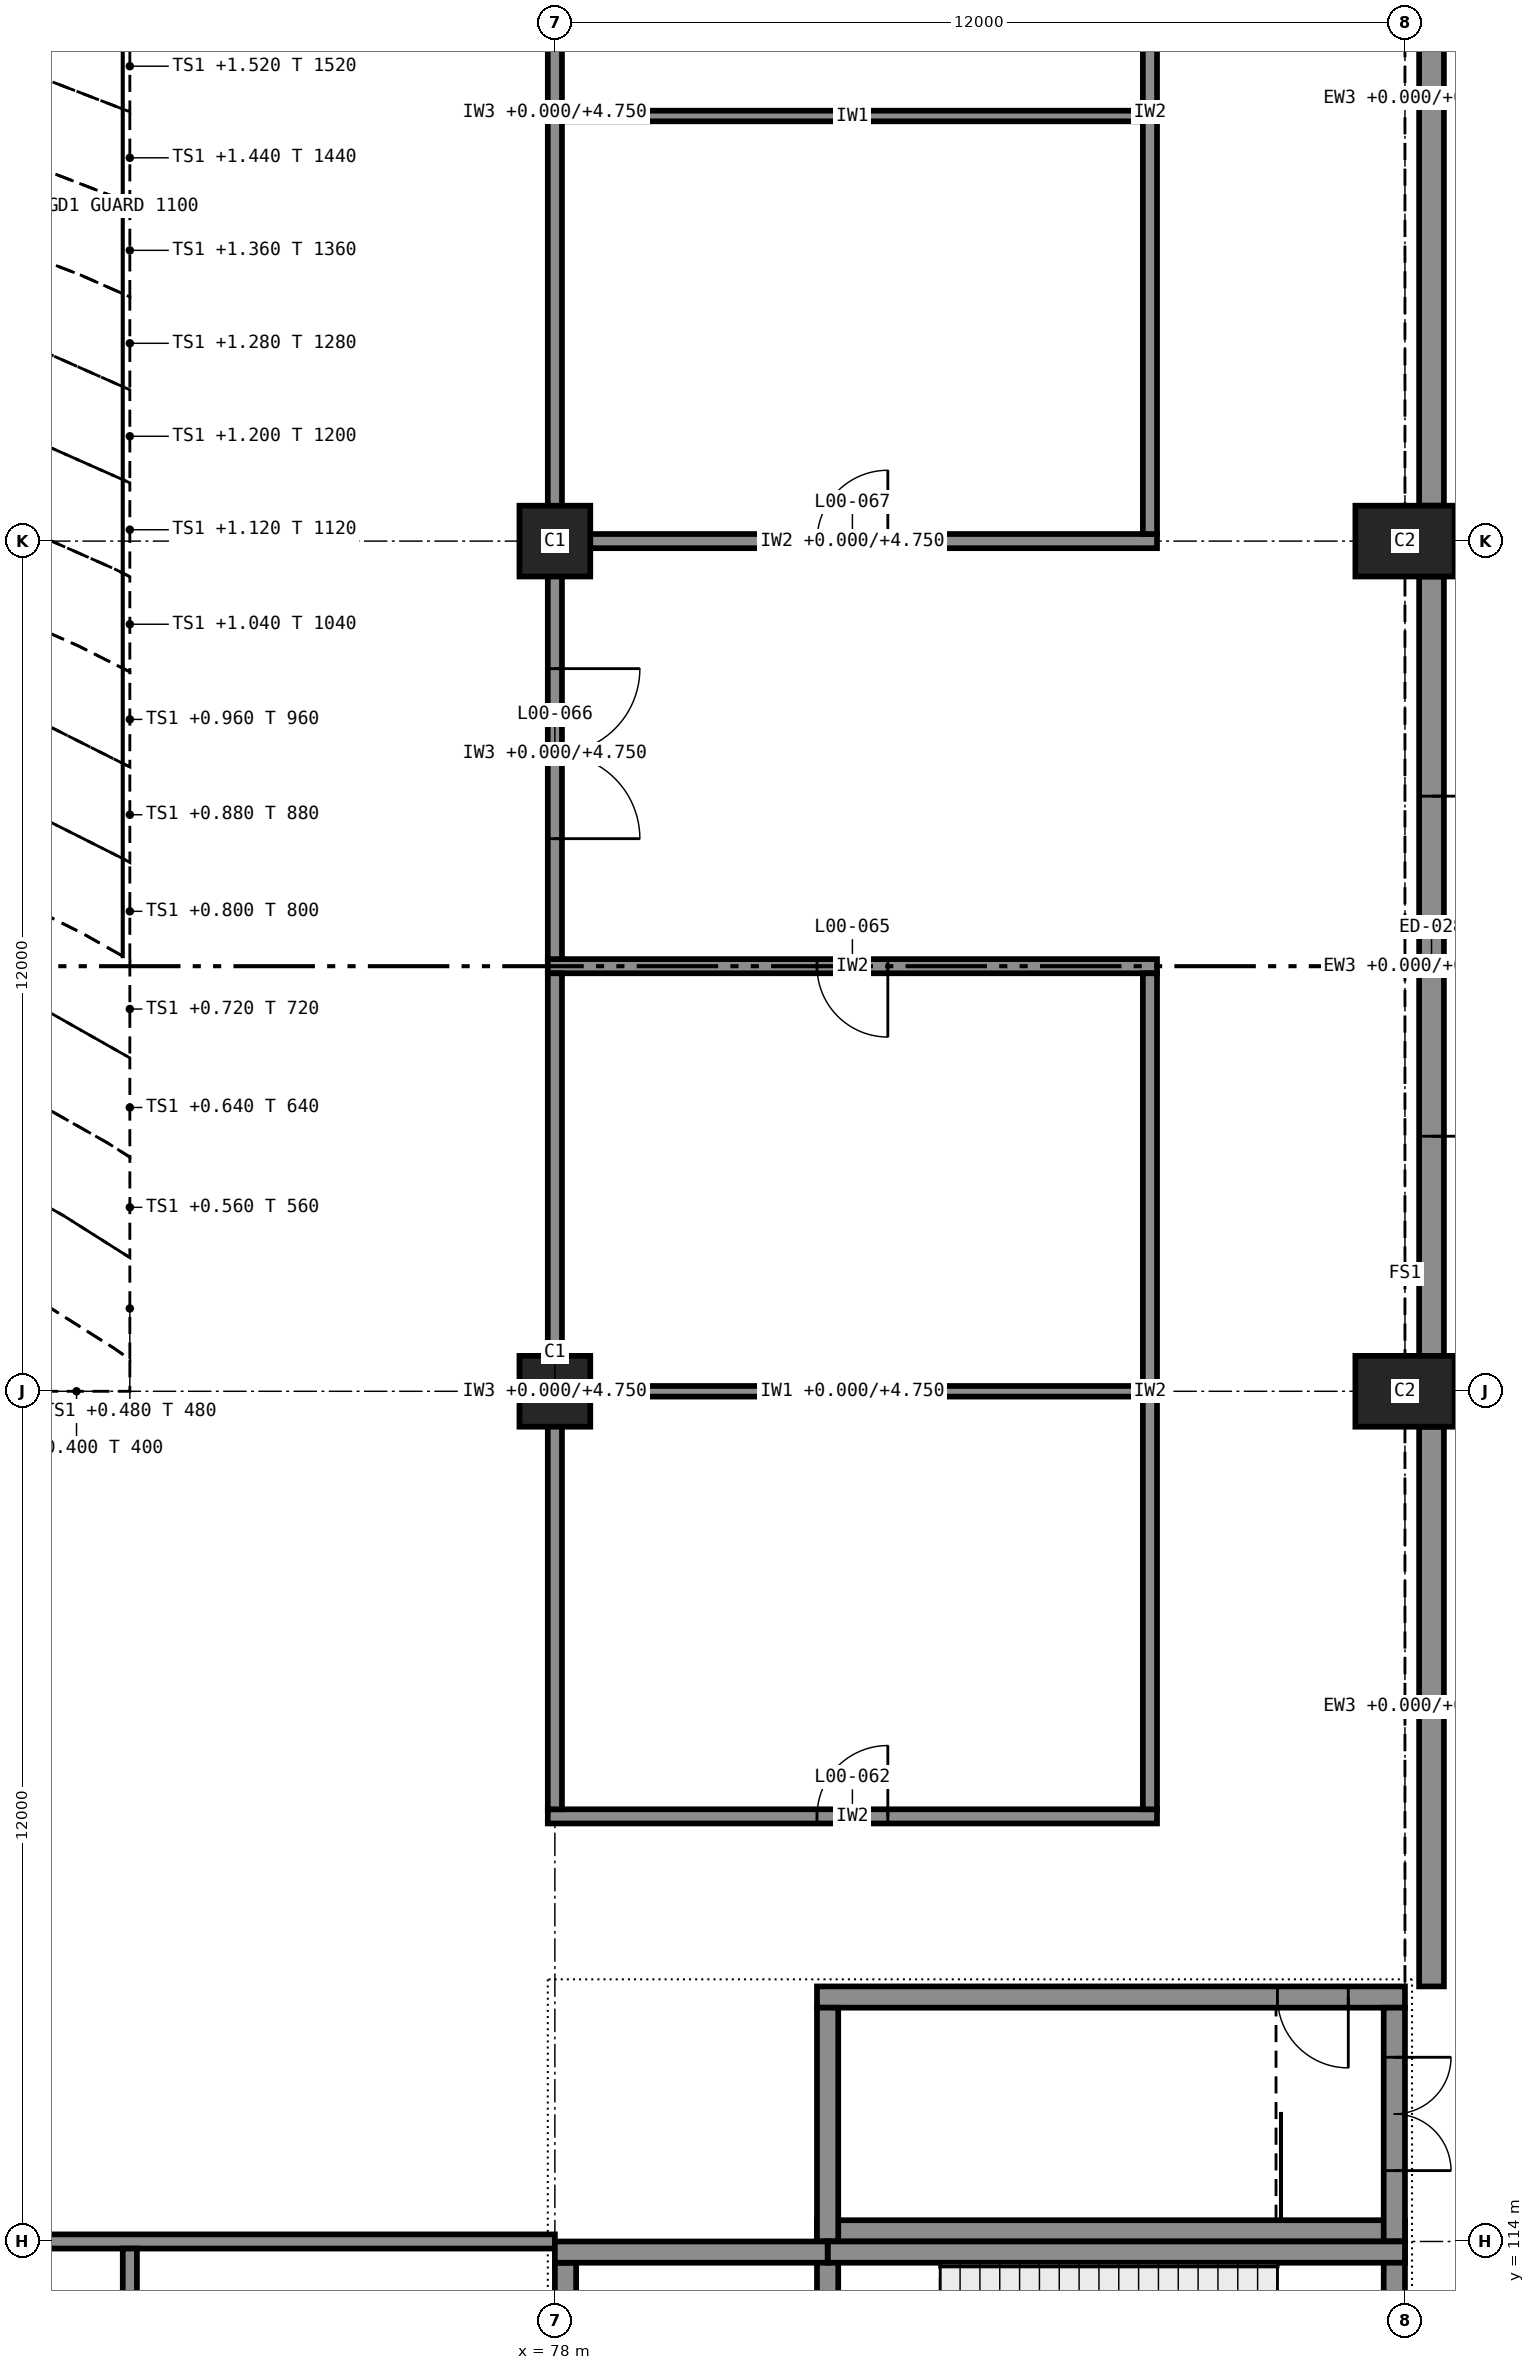
"""IFC4 building model, lengths in metres.
Left out: names, types, materials, properties, quantities, classifications, styles, units other than length and angle.
Written with IfcOpenShell. Run it as: python <this file> out.ifc"""

import sys

from ifc_helpers import new_model, si_unit, direction, frame, frame_2d, origin, origin_2d, place, context, subcontext, project, spatial, rectangle, extrude, element, fill, save


model = new_model("IFC4")
c1 = context("Model", 3, precision=1e-05, world=origin(), true_north=direction((0.0, 1.0)))
c2 = subcontext(c1, "Body", "Model", "MODEL_VIEW")
j1 = project(units=[si_unit("LENGTHUNIT", "METRE"), si_unit("PLANEANGLEUNIT", "RADIAN")], contexts=[c1])
p1 = place(None, origin())
s1 = spatial("IfcSite", under=j1, at=p1, CompositionType="ELEMENT")
p2 = place(p1, origin())
s2 = spatial("IfcBuilding", under=s1, at=p2, CompositionType="ELEMENT")
p3 = place(p2, origin())
s3 = spatial("IfcBuildingStorey", under=s2, at=p3, CompositionType="ELEMENT", Elevation=0.0)
for number, where, z_axis, x_axis in (
    (1, (78.0, 126.0, 0.0), (0.0, 0.0, 1.0), (1.0, 0.0, 0.0)),
    (2, (78.0, 138.0, 0.0), (0.0, 0.0, 1.0), (1.0, 0.0, 0.0)),
):
    element("IfcColumn", number, at=place(p3, frame(where, z_axis=z_axis, x_axis=x_axis)), inside=s3, PredefinedType="COLUMN", context=c2, shape_type="SweptSolid", body=[
        extrude(rectangle(XDim=1.0, YDim=1.0, at=origin_2d()), origin(), (0.0, 0.0, 1.0), 6.0),
    ])
for number, where, z_axis, x_axis in (
    (3, (90.0, 126.0, 0.0), (0.0, 0.0, 1.0), (1.0, 0.0, 0.0)),
    (4, (90.0, 138.0, 0.0), (0.0, 0.0, 1.0), (1.0, 0.0, 0.0)),
):
    element("IfcColumn", number, at=place(p3, frame(where, z_axis=z_axis, x_axis=x_axis)), inside=s3, PredefinedType="COLUMN", context=c2, shape_type="SweptSolid", body=[
        extrude(rectangle(XDim=1.4, YDim=1.0, at=origin_2d()), origin(), (0.0, 0.0, 1.0), 6.0),
    ])
p4 = place(p3, frame((90.0, 114.15, 0.0), z_axis=(0.0, 0.0, 1.0), x_axis=(-1.0, 0.0, 0.0)))
e5 = element("IfcWall", 5, at=p4, inside=s3, PredefinedType="SHEAR", context=c2, shape_type="SweptSolid", body=[
    extrude(rectangle(XDim=8.3, YDim=0.3, at=frame_2d((4.15, 0.0))), origin(), (0.0, 0.0, 1.0), 5.75),
])
p5 = place(p3, frame((90.0, 117.45, 0.0), z_axis=(0.0, 0.0, 1.0), x_axis=(-1.0, 0.0, 0.0)))
e6 = element("IfcWall", 6, at=p5, inside=s3, PredefinedType="SHEAR", context=c2, shape_type="SweptSolid", body=[
    extrude(rectangle(XDim=8.3, YDim=0.3, at=frame_2d((4.15, 0.0))), origin(), (0.0, 0.0, 1.0), 5.75),
])
p6 = place(p5, frame((0.8, 0.0, 0.0)))
e7 = element("IfcOpeningElement", 7, at=p6, cuts=e6, PredefinedType="OPENING", context=c2, shape_type="SweptSolid", body=[
    extrude(rectangle(XDim=1.0, YDim=2.1, at=frame_2d((0.5, 1.05))), frame((0.0, 0.16, 0.0), z_axis=(0.0, -1.0, 0.0), x_axis=(1.0, 0.0, 0.0)), (0.0, 0.0, 1.0), 0.32),
])
p7 = place(p3, frame((89.85, 114.0, 0.0), z_axis=(0.0, 0.0, 1.0), x_axis=(0.0, 1.0, 0.0)))
e8 = element("IfcWall", 8, at=p7, inside=s3, PredefinedType="SHEAR", context=c2, shape_type="SweptSolid", body=[
    extrude(rectangle(XDim=3.3, YDim=0.3, at=frame_2d((1.65, 0.0))), origin(), (0.0, 0.0, 1.0), 5.75),
])
p8 = place(p7, frame((1.0, 0.0, 0.0)))
e9 = element("IfcOpeningElement", 9, at=p8, cuts=e8, PredefinedType="OPENING", context=c2, shape_type="SweptSolid", body=[
    extrude(rectangle(XDim=1.6, YDim=2.1, at=frame_2d((0.8, 1.05))), frame((0.0, 0.16, 0.0), z_axis=(0.0, -1.0, 0.0), x_axis=(1.0, 0.0, 0.0)), (0.0, 0.0, 1.0), 0.32),
])
p9 = place(p3, frame((81.85, 114.0, 0.0), z_axis=(0.0, 0.0, 1.0), x_axis=(0.0, 1.0, 0.0)))
e10 = element("IfcWall", 10, at=p9, inside=s3, PredefinedType="SHEAR", context=c2, shape_type="SweptSolid", body=[
    extrude(rectangle(XDim=3.3, YDim=0.3, at=frame_2d((1.65, 0.0))), origin(), (0.0, 0.0, 1.0), 5.75),
])
p10 = place(p3, frame((90.0, 113.85, 0.0), z_axis=(0.0, 0.0, 1.0), x_axis=(-1.0, 0.0, 0.0)))
e11 = element("IfcWall", 11, at=p10, inside=s3, PredefinedType="SHEAR", context=c2, shape_type="SweptSolid", body=[
    extrude(rectangle(XDim=8.15, YDim=0.3, at=frame_2d((4.075, 0.0))), origin(), (0.0, 0.0, 1.0), 5.75),
])
p11 = place(p3, frame((81.85, 113.85, 0.0), z_axis=(0.0, 0.0, 1.0), x_axis=(-1.0, 0.0, 0.0)))
e12 = element("IfcWall", 12, at=p11, inside=s3, PredefinedType="SHEAR", context=c2, shape_type="SweptSolid", body=[
    extrude(rectangle(XDim=3.85, YDim=0.3, at=frame_2d((1.925, 0.0))), origin(), (0.0, 0.0, 1.0), 5.75),
])
p12 = place(p3, frame((89.85, 110.55, 0.0), z_axis=(0.0, 0.0, 1.0), x_axis=(0.0, 1.0, 0.0)))
e13 = element("IfcWall", 13, at=p12, inside=s3, PredefinedType="SHEAR", context=c2, shape_type="SweptSolid", body=[
    extrude(rectangle(XDim=3.45, YDim=0.3, at=frame_2d((1.725, 0.0))), origin(), (0.0, 0.0, 1.0), 5.75),
])
p13 = place(p12, frame((0.85, 0.0, 0.0)))
e14 = element("IfcOpeningElement", 14, at=p13, cuts=e13, PredefinedType="OPENING", context=c2, shape_type="SweptSolid", body=[
    extrude(rectangle(XDim=1.6, YDim=2.1, at=frame_2d((0.8, 1.05))), frame((0.0, 0.16, 0.0), z_axis=(0.0, -1.0, 0.0), x_axis=(1.0, 0.0, 0.0)), (0.0, 0.0, 1.0), 0.32),
])
p14 = place(p3, frame((78.15, 110.55, 0.0), z_axis=(0.0, 0.0, 1.0), x_axis=(0.0, 1.0, 0.0)))
e15 = element("IfcWall", 15, at=p14, inside=s3, PredefinedType="SHEAR", context=c2, shape_type="SweptSolid", body=[
    extrude(rectangle(XDim=3.15, YDim=0.3, at=frame_2d((1.575, 0.0))), origin(), (0.0, 0.0, 1.0), 5.75),
])
p15 = place(p14, frame((1.15, 0.0, 0.0)))
e16 = element("IfcOpeningElement", 16, at=p15, cuts=e15, PredefinedType="OPENING", context=c2, shape_type="SweptSolid", body=[
    extrude(rectangle(XDim=1.0, YDim=2.1, at=frame_2d((0.5, 1.05))), frame((0.0, 0.16, 0.0), z_axis=(0.0, -1.0, 0.0), x_axis=(1.0, 0.0, 0.0)), (0.0, 0.0, 1.0), 0.32),
])
p16 = place(p3, frame((81.85, 110.7, 0.0), z_axis=(0.0, 0.0, 1.0), x_axis=(0.0, 1.0, 0.0)))
e17 = element("IfcWall", 17, at=p16, inside=s3, PredefinedType="SHEAR", context=c2, shape_type="SweptSolid", body=[
    extrude(rectangle(XDim=3.3, YDim=0.3, at=frame_2d((1.65, 0.0))), origin(), (0.0, 0.0, 1.0), 5.75),
])
p17 = place(p3, frame((90.375, 117.6, 0.0), z_axis=(0.0, 0.0, 1.0), x_axis=(0.0, 1.0, 0.0)))
e18 = element("IfcWall", 18, at=p17, inside=s3, PredefinedType="STANDARD", context=c2, shape_type="SweptSolid", body=[
    extrude(rectangle(XDim=7.9, YDim=0.35, at=frame_2d((3.95, 0.0))), origin(), (0.0, 0.0, 1.0), 6.0),
])
p18 = place(p3, frame((90.375, 126.5, 0.0), z_axis=(0.0, 0.0, 1.0), x_axis=(0.0, 1.0, 0.0)))
e19 = element("IfcWall", 19, at=p18, inside=s3, PredefinedType="STANDARD", context=c2, shape_type="SweptSolid", body=[
    extrude(rectangle(XDim=11.0, YDim=0.35, at=frame_2d((5.5, 0.0))), origin(), (0.0, 0.0, 1.0), 6.0),
])
p19 = place(p18, frame((3.1, 0.0, 0.0)))
e20 = element("IfcOpeningElement", 20, at=p19, cuts=e19, PredefinedType="OPENING", context=c2, shape_type="SweptSolid", body=[
    extrude(rectangle(XDim=4.8, YDim=2.4, at=frame_2d((2.4, 1.2))), frame((0.0, 0.185, 0.0), z_axis=(0.0, -1.0, 0.0), x_axis=(1.0, 0.0, 0.0)), (0.0, 0.0, 1.0), 0.37),
])
p20 = place(p3, frame((90.375, 138.5, 0.0), z_axis=(0.0, 0.0, 1.0), x_axis=(0.0, 1.0, 0.0)))
e21 = element("IfcWall", 21, at=p20, inside=s3, PredefinedType="STANDARD", context=c2, shape_type="SweptSolid", body=[
    extrude(rectangle(XDim=11.5, YDim=0.35, at=frame_2d((5.75, 0.0))), origin(), (0.0, 0.0, 1.0), 6.0),
])
p21 = place(p3, frame((29.9, 114.0, 0.0), z_axis=(0.0, 0.0, 1.0), x_axis=(1.0, 0.0, 0.0)))
e22 = element("IfcWall", 22, at=p21, inside=s3, PredefinedType="PARTITIONING", context=c2, shape_type="SweptSolid", body=[
    extrude(rectangle(XDim=48.1, YDim=0.2, at=frame_2d((24.05, 0.0))), origin(), (0.0, 0.0, 1.0), 4.75),
])
p22 = place(p3, frame((77.9, 120.0, 0.0), z_axis=(0.0, 0.0, 1.0), x_axis=(1.0, 0.0, 0.0)))
e23 = element("IfcWall", 23, at=p22, inside=s3, PredefinedType="PARTITIONING", context=c2, shape_type="SweptSolid", body=[
    extrude(rectangle(XDim=8.6, YDim=0.2, at=frame_2d((4.3, 0.0))), origin(), (0.0, 0.0, 1.0), 5.75),
])
p23 = place(p22, frame((3.8, 0.0, 0.0)))
e24 = element("IfcOpeningElement", 24, at=p23, cuts=e23, PredefinedType="OPENING", context=c2, shape_type="SweptSolid", body=[
    extrude(rectangle(XDim=1.0, YDim=2.1, at=frame_2d((0.5, 1.05))), frame((0.0, 0.11, 0.0), z_axis=(0.0, -1.0, 0.0), x_axis=(1.0, 0.0, 0.0)), (0.0, 0.0, 1.0), 0.22),
])
p24 = place(p3, frame((78.1, 126.0, 0.0), z_axis=(0.0, 0.0, 1.0), x_axis=(1.0, 0.0, 0.0)))
e25 = element("IfcWall", 25, at=p24, inside=s3, PredefinedType="PARTITIONING", context=c2, shape_type="SweptSolid", body=[
    extrude(rectangle(XDim=8.2, YDim=0.15, at=frame_2d((4.1, 0.0))), origin(), (0.0, 0.0, 1.0), 4.75),
])
p25 = place(p3, frame((77.9, 132.0, 0.0), z_axis=(0.0, 0.0, 1.0), x_axis=(1.0, 0.0, 0.0)))
e26 = element("IfcWall", 26, at=p25, inside=s3, PredefinedType="PARTITIONING", context=c2, shape_type="SweptSolid", body=[
    extrude(rectangle(XDim=8.6, YDim=0.2, at=frame_2d((4.3, 0.0))), origin(), (0.0, 0.0, 1.0), 5.75),
])
p26 = place(p25, frame((3.8, 0.0, 0.0)))
e27 = element("IfcOpeningElement", 27, at=p26, cuts=e26, PredefinedType="OPENING", context=c2, shape_type="SweptSolid", body=[
    extrude(rectangle(XDim=1.0, YDim=2.1, at=frame_2d((0.5, 1.05))), frame((0.0, 0.11, 0.0), z_axis=(0.0, -1.0, 0.0), x_axis=(1.0, 0.0, 0.0)), (0.0, 0.0, 1.0), 0.22),
])
p27 = place(p3, frame((77.9, 138.0, 0.0), z_axis=(0.0, 0.0, 1.0), x_axis=(1.0, 0.0, 0.0)))
e28 = element("IfcWall", 28, at=p27, inside=s3, PredefinedType="PARTITIONING", context=c2, shape_type="SweptSolid", body=[
    extrude(rectangle(XDim=8.6, YDim=0.2, at=frame_2d((4.3, 0.0))), origin(), (0.0, 0.0, 1.0), 4.75),
])
p28 = place(p27, frame((3.8, 0.0, 0.0)))
e29 = element("IfcOpeningElement", 29, at=p28, cuts=e28, PredefinedType="OPENING", context=c2, shape_type="SweptSolid", body=[
    extrude(rectangle(XDim=1.0, YDim=2.1, at=frame_2d((0.5, 1.05))), frame((0.0, 0.11, 0.0), z_axis=(0.0, -1.0, 0.0), x_axis=(1.0, 0.0, 0.0)), (0.0, 0.0, 1.0), 0.22),
])
p29 = place(p3, frame((78.1, 144.0, 0.0), z_axis=(0.0, 0.0, 1.0), x_axis=(1.0, 0.0, 0.0)))
e30 = element("IfcWall", 30, at=p29, inside=s3, PredefinedType="PARTITIONING", context=c2, shape_type="SweptSolid", body=[
    extrude(rectangle(XDim=8.2, YDim=0.15, at=frame_2d((4.1, 0.0))), origin(), (0.0, 0.0, 1.0), 5.75),
])
p30 = place(p3, frame((72.0, 108.1, 0.0), z_axis=(0.0, 0.0, 1.0), x_axis=(0.0, 1.0, 0.0)))
e31 = element("IfcWall", 31, at=p30, inside=s3, PredefinedType="PARTITIONING", context=c2, shape_type="SweptSolid", body=[
    extrude(rectangle(XDim=5.8, YDim=0.2, at=frame_2d((2.9, 0.0))), origin(), (0.0, 0.0, 1.0), 5.75),
])
p31 = place(p3, frame((78.0, 120.1, 0.0), z_axis=(0.0, 0.0, 1.0), x_axis=(0.0, 1.0, 0.0)))
e32 = element("IfcWall", 32, at=p31, inside=s3, PredefinedType="PARTITIONING", context=c2, shape_type="SweptSolid", body=[
    extrude(rectangle(XDim=11.8, YDim=0.2, at=frame_2d((5.9, 0.0))), origin(), (0.0, 0.0, 1.0), 4.75),
])
p32 = place(p3, frame((78.0, 132.1, 0.0), z_axis=(0.0, 0.0, 1.0), x_axis=(0.0, 1.0, 0.0)))
e33 = element("IfcWall", 33, at=p32, inside=s3, PredefinedType="PARTITIONING", context=c2, shape_type="SweptSolid", body=[
    extrude(rectangle(XDim=5.8, YDim=0.2, at=frame_2d((2.9, 0.0))), origin(), (0.0, 0.0, 1.0), 4.75),
])
p33 = place(p32, frame((1.7, 0.0, 0.0)))
e34 = element("IfcOpeningElement", 34, at=p33, cuts=e33, PredefinedType="OPENING", context=c2, shape_type="SweptSolid", body=[
    extrude(rectangle(XDim=2.4, YDim=2.4, at=frame_2d((1.2, 1.2))), frame((0.0, 0.11, 0.0), z_axis=(0.0, -1.0, 0.0), x_axis=(1.0, 0.0, 0.0)), (0.0, 0.0, 1.0), 0.22),
])
p34 = place(p3, frame((78.0, 138.1, 0.0), z_axis=(0.0, 0.0, 1.0), x_axis=(0.0, 1.0, 0.0)))
e35 = element("IfcWall", 35, at=p34, inside=s3, PredefinedType="PARTITIONING", context=c2, shape_type="SweptSolid", body=[
    extrude(rectangle(XDim=11.9, YDim=0.2, at=frame_2d((5.95, 0.0))), origin(), (0.0, 0.0, 1.0), 4.75),
])
p35 = place(p3, frame((86.4, 120.1, 0.0), z_axis=(0.0, 0.0, 1.0), x_axis=(0.0, 1.0, 0.0)))
e36 = element("IfcWall", 36, at=p35, inside=s3, PredefinedType="PARTITIONING", context=c2, shape_type="SweptSolid", body=[
    extrude(rectangle(XDim=11.8, YDim=0.2, at=frame_2d((5.9, 0.0))), origin(), (0.0, 0.0, 1.0), 5.75),
])
p36 = place(p3, frame((86.4, 138.1, 0.0), z_axis=(0.0, 0.0, 1.0), x_axis=(0.0, 1.0, 0.0)))
e37 = element("IfcWall", 37, at=p36, inside=s3, PredefinedType="PARTITIONING", context=c2, shape_type="SweptSolid", body=[
    extrude(rectangle(XDim=11.9, YDim=0.2, at=frame_2d((5.95, 0.0))), origin(), (0.0, 0.0, 1.0), 5.75),
])
p37 = place(p36, frame((8.4, 0.0, 0.0)))
e38 = element("IfcOpeningElement", 38, at=p37, cuts=e37, PredefinedType="OPENING", context=c2, shape_type="SweptSolid", body=[
    extrude(rectangle(XDim=1.0, YDim=2.1, at=frame_2d((0.5, 1.05))), frame((0.0, 0.11, 0.0), z_axis=(0.0, -1.0, 0.0), x_axis=(1.0, 0.0, 0.0)), (0.0, 0.0, 1.0), 0.22),
])
p38 = place(p19, frame((4.8, 0.0, 0.0), z_axis=(0.0, 0.0, 1.0), x_axis=(-1.0, 0.0, 0.0)))
e39 = element("IfcDoor", 39, at=p38, inside=s3, OperationType="DOUBLE_DOOR_SINGLE_SWING", PredefinedType="DOOR", context=c2, shape_type="SweptSolid", body=[
    extrude(rectangle(XDim=4.8, YDim=2.4, at=frame_2d((2.4, 1.2))), frame((0.0, 0.025, 0.0), z_axis=(0.0, -1.0, 0.0), x_axis=(1.0, 0.0, 0.0)), (0.0, 0.0, 1.0), 0.05),
])
fill(e20, e39)
p39 = place(p8, frame((1.6, 0.0, 0.0), z_axis=(0.0, 0.0, 1.0), x_axis=(-1.0, 0.0, 0.0)))
e40 = element("IfcDoor", 40, at=p39, inside=s3, OperationType="DOUBLE_DOOR_SINGLE_SWING", PredefinedType="DOOR", context=c2, shape_type="SweptSolid", body=[
    extrude(rectangle(XDim=1.6, YDim=2.1, at=frame_2d((0.8, 1.05))), frame((0.0, 0.025, 0.0), z_axis=(0.0, -1.0, 0.0), x_axis=(1.0, 0.0, 0.0)), (0.0, 0.0, 1.0), 0.05),
])
fill(e9, e40)
p40 = place(p6, origin())
e41 = element("IfcDoor", 41, at=p40, inside=s3, OperationType="SINGLE_SWING_RIGHT", PredefinedType="DOOR", context=c2, shape_type="SweptSolid", body=[
    extrude(rectangle(XDim=1.0, YDim=2.1, at=frame_2d((0.5, 1.05))), frame((0.0, 0.025, 0.0), z_axis=(0.0, -1.0, 0.0), x_axis=(1.0, 0.0, 0.0)), (0.0, 0.0, 1.0), 0.05),
])
fill(e7, e41)
p41 = place(p23, origin())
e42 = element("IfcDoor", 42, at=p41, inside=s3, OperationType="SINGLE_SWING_LEFT", PredefinedType="DOOR", context=c2, shape_type="SweptSolid", body=[
    extrude(rectangle(XDim=1.0, YDim=2.1, at=frame_2d((0.5, 1.05))), frame((0.0, 0.025, 0.0), z_axis=(0.0, -1.0, 0.0), x_axis=(1.0, 0.0, 0.0)), (0.0, 0.0, 1.0), 0.05),
])
fill(e24, e42)
p42 = place(p26, frame((1.0, 0.0, 0.0), z_axis=(0.0, 0.0, 1.0), x_axis=(-1.0, 0.0, 0.0)))
e43 = element("IfcDoor", 43, at=p42, inside=s3, OperationType="SINGLE_SWING_RIGHT", PredefinedType="DOOR", context=c2, shape_type="SweptSolid", body=[
    extrude(rectangle(XDim=1.0, YDim=2.1, at=frame_2d((0.5, 1.05))), frame((0.0, 0.025, 0.0), z_axis=(0.0, -1.0, 0.0), x_axis=(1.0, 0.0, 0.0)), (0.0, 0.0, 1.0), 0.05),
])
fill(e27, e43)
p43 = place(p33, frame((2.4, 0.0, 0.0), z_axis=(0.0, 0.0, 1.0), x_axis=(-1.0, 0.0, 0.0)))
e44 = element("IfcDoor", 44, at=p43, inside=s3, OperationType="DOUBLE_DOOR_SINGLE_SWING", PredefinedType="DOOR", context=c2, shape_type="SweptSolid", body=[
    extrude(rectangle(XDim=2.4, YDim=2.4, at=frame_2d((1.2, 1.2))), frame((0.0, 0.025, 0.0), z_axis=(0.0, -1.0, 0.0), x_axis=(1.0, 0.0, 0.0)), (0.0, 0.0, 1.0), 0.05),
])
fill(e34, e44)
p44 = place(p28, origin())
e45 = element("IfcDoor", 45, at=p44, inside=s3, OperationType="SINGLE_SWING_LEFT", PredefinedType="DOOR", context=c2, shape_type="SweptSolid", body=[
    extrude(rectangle(XDim=1.0, YDim=2.1, at=frame_2d((0.5, 1.05))), frame((0.0, 0.025, 0.0), z_axis=(0.0, -1.0, 0.0), x_axis=(1.0, 0.0, 0.0)), (0.0, 0.0, 1.0), 0.05),
])
fill(e29, e45)
save(model, sys.argv[1])
